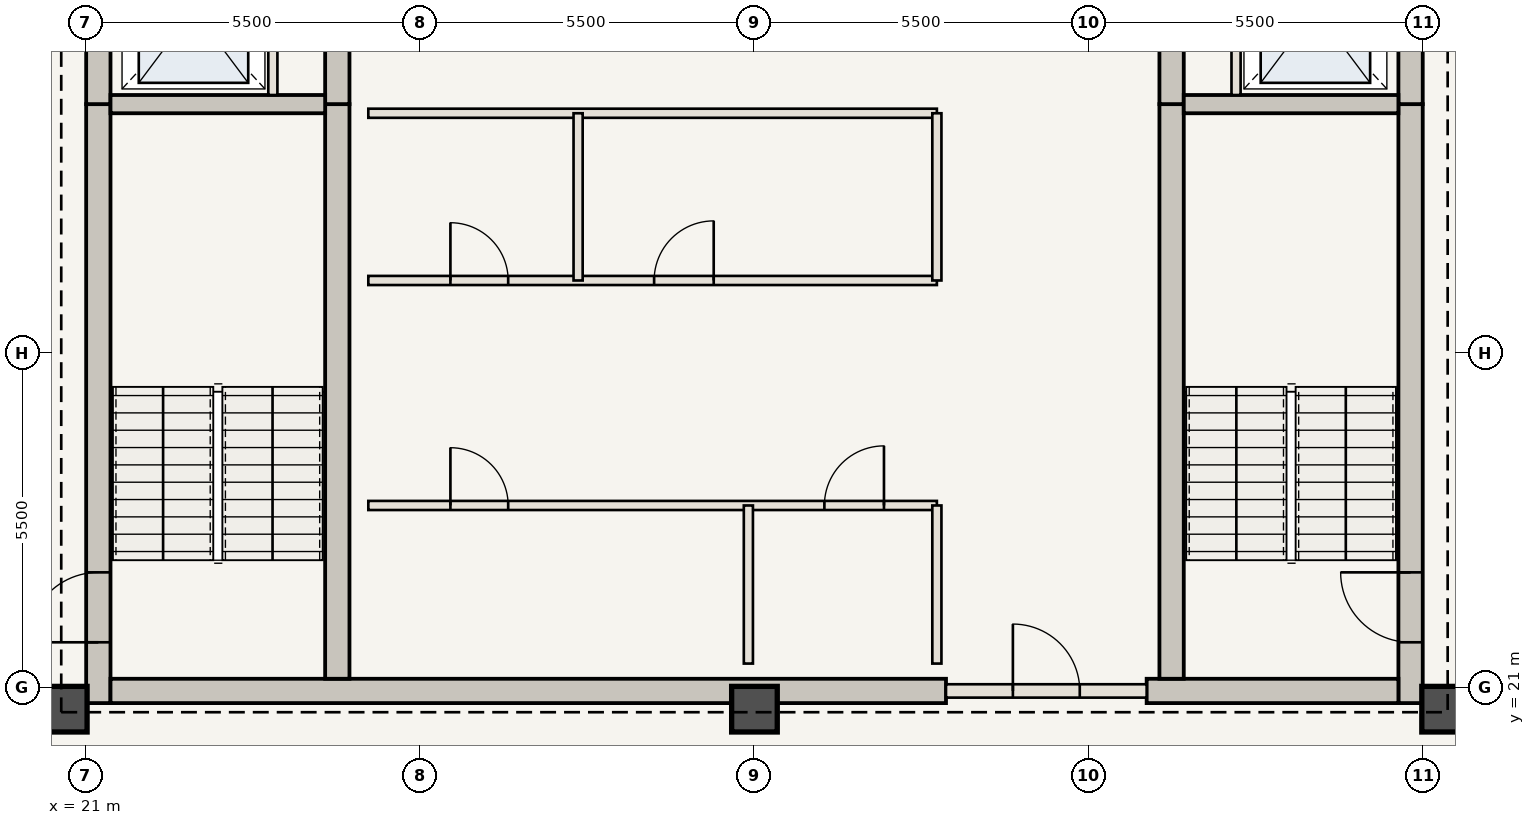
"""IFC4 building model, lengths in metres.
Left out: names, types, materials, properties, quantities, classifications, styles, units other than length and angle.
Written with IfcOpenShell. Run it as: python <this file> out.ifc"""

import sys

from ifc_helpers import new_model, si_unit, direction, frame, frame_2d, origin, origin_2d, place, context, subcontext, project, spatial, rectangle, extrude, element, fill, save


model = new_model("IFC4")
c1 = context("Model", 3, precision=1e-05, world=origin(), true_north=direction((0.0, 1.0)))
c2 = subcontext(c1, "Body", "Model", "MODEL_VIEW")
j1 = project(units=[si_unit("LENGTHUNIT", "METRE"), si_unit("PLANEANGLEUNIT", "RADIAN")], contexts=[c1])
p1 = place(None, origin())
s1 = spatial("IfcSite", under=j1, at=p1, CompositionType="ELEMENT")
p2 = place(p1, origin())
s2 = spatial("IfcBuilding", under=s1, at=p2, CompositionType="ELEMENT")
p3 = place(p2, frame((0.0, 0.0, 292.95)))
s3 = spatial("IfcBuildingStorey", under=s2, at=p3, CompositionType="ELEMENT", Elevation=292.95)
p4 = place(p3, frame((21.21, 20.75, 0.0), z_axis=(0.0, 0.0, 1.0), x_axis=(0.0, 1.0, 0.0)))
e1 = element("IfcWall", 1, at=p4, inside=s3, PredefinedType="SHEAR", context=c2, shape_type="SweptSolid", body=[
    extrude(rectangle(XDim=9.85, YDim=0.4, at=frame_2d((4.925, 0.0))), origin(), (0.0, 0.0, 1.0), 3.85),
])
p5 = place(p4, frame((1.0, 0.0, 0.0)))
e2 = element("IfcOpeningElement", 2, at=p5, cuts=e1, PredefinedType="OPENING", context=c2, shape_type="SweptSolid", body=[
    extrude(rectangle(XDim=1.15, YDim=2.15, at=frame_2d((0.575, 1.075))), frame((0.0, 0.21, 0.0), z_axis=(0.0, -1.0, 0.0), x_axis=(1.0, 0.0, 0.0)), (0.0, 0.0, 1.0), 0.42),
])
p6 = place(p3, frame((21.21, 30.6, 0.0), z_axis=(0.0, 0.0, 1.0), x_axis=(0.0, 1.0, 0.0)))
e3 = element("IfcWall", 3, at=p6, inside=s3, PredefinedType="SHEAR", context=c2, shape_type="SweptSolid", body=[
    extrude(rectangle(XDim=12.6, YDim=0.4, at=frame_2d((6.3, 0.0))), origin(), (0.0, 0.0, 1.0), 3.85),
])
p7 = place(p6, frame((4.2, 0.0, 0.0)))
e4 = element("IfcOpeningElement", 4, at=p7, cuts=e3, PredefinedType="OPENING", context=c2, shape_type="SweptSolid", body=[
    extrude(rectangle(XDim=1.1, YDim=2.15, at=frame_2d((0.55, 1.075))), frame((0.0, 0.21, 0.0), z_axis=(0.0, -1.0, 0.0), x_axis=(1.0, 0.0, 0.0)), (0.0, 0.0, 1.0), 0.42),
])
p8 = place(p6, frame((8.05, 0.0, 0.0)))
e5 = element("IfcOpeningElement", 5, at=p8, cuts=e3, PredefinedType="OPENING", context=c2, shape_type="SweptSolid", body=[
    extrude(rectangle(XDim=0.92, YDim=2.1, at=frame_2d((0.46, 1.05))), frame((0.0, 0.21, 0.0), z_axis=(0.0, -1.0, 0.0), x_axis=(1.0, 0.0, 0.0)), (0.0, 0.0, 1.0), 0.42),
])
p9 = place(p6, frame((9.45, 0.0, 0.0)))
e6 = element("IfcOpeningElement", 6, at=p9, cuts=e3, PredefinedType="OPENING", context=c2, shape_type="SweptSolid", body=[
    extrude(rectangle(XDim=0.88, YDim=2.1, at=frame_2d((0.44, 1.05))), frame((0.0, 0.21, 0.0), z_axis=(0.0, -1.0, 0.0), x_axis=(1.0, 0.0, 0.0)), (0.0, 0.0, 1.0), 0.42),
])
p10 = place(p6, frame((10.85, 0.0, 0.0)))
e7 = element("IfcOpeningElement", 7, at=p10, cuts=e3, PredefinedType="OPENING", context=c2, shape_type="SweptSolid", body=[
    extrude(rectangle(XDim=0.88, YDim=2.1, at=frame_2d((0.44, 1.05))), frame((0.0, 0.21, 0.0), z_axis=(0.0, -1.0, 0.0), x_axis=(1.0, 0.0, 0.0)), (0.0, 0.0, 1.0), 0.42),
])
p11 = place(p3, frame((42.79, 20.75, 0.0), z_axis=(0.0, 0.0, 1.0), x_axis=(0.0, 1.0, 0.0)))
e8 = element("IfcWall", 8, at=p11, inside=s3, PredefinedType="SHEAR", context=c2, shape_type="SweptSolid", body=[
    extrude(rectangle(XDim=9.85, YDim=0.4, at=frame_2d((4.925, 0.0))), origin(), (0.0, 0.0, 1.0), 3.85),
])
p12 = place(p11, frame((1.0, 0.0, 0.0)))
e9 = element("IfcOpeningElement", 9, at=p12, cuts=e8, PredefinedType="OPENING", context=c2, shape_type="SweptSolid", body=[
    extrude(rectangle(XDim=1.15, YDim=2.15, at=frame_2d((0.575, 1.075))), frame((0.0, 0.21, 0.0), z_axis=(0.0, -1.0, 0.0), x_axis=(1.0, 0.0, 0.0)), (0.0, 0.0, 1.0), 0.42),
])
p13 = place(p3, frame((42.79, 30.6, 0.0), z_axis=(0.0, 0.0, 1.0), x_axis=(0.0, 1.0, 0.0)))
e10 = element("IfcWall", 10, at=p13, inside=s3, PredefinedType="SHEAR", context=c2, shape_type="SweptSolid", body=[
    extrude(rectangle(XDim=12.6, YDim=0.4, at=frame_2d((6.3, 0.0))), origin(), (0.0, 0.0, 1.0), 3.85),
])
p14 = place(p13, frame((4.2, 0.0, 0.0)))
e11 = element("IfcOpeningElement", 11, at=p14, cuts=e10, PredefinedType="OPENING", context=c2, shape_type="SweptSolid", body=[
    extrude(rectangle(XDim=1.1, YDim=2.15, at=frame_2d((0.55, 1.075))), frame((0.0, 0.21, 0.0), z_axis=(0.0, -1.0, 0.0), x_axis=(1.0, 0.0, 0.0)), (0.0, 0.0, 1.0), 0.42),
])
p15 = place(p13, frame((9.2, 0.0, 0.0)))
e12 = element("IfcOpeningElement", 12, at=p15, cuts=e10, PredefinedType="OPENING", context=c2, shape_type="SweptSolid", body=[
    extrude(rectangle(XDim=0.92, YDim=2.1, at=frame_2d((0.46, 1.05))), frame((0.0, 0.21, 0.0), z_axis=(0.0, -1.0, 0.0), x_axis=(1.0, 0.0, 0.0)), (0.0, 0.0, 1.0), 0.42),
])
p16 = place(p3, frame((21.41, 20.95, 0.0), z_axis=(0.0, 0.0, 1.0), x_axis=(1.0, 0.0, 0.0)))
e13 = element("IfcWall", 13, at=p16, inside=s3, PredefinedType="SHEAR", context=c2, shape_type="SweptSolid", body=[
    extrude(rectangle(XDim=13.74, YDim=0.4, at=frame_2d((6.87, 0.0))), origin(), (0.0, 0.0, 1.0), 3.85),
])
p17 = place(p3, frame((38.45, 20.95, 0.0), z_axis=(0.0, 0.0, 1.0), x_axis=(1.0, 0.0, 0.0)))
e14 = element("IfcWall", 14, at=p17, inside=s3, PredefinedType="SHEAR", context=c2, shape_type="SweptSolid", body=[
    extrude(rectangle(XDim=4.14, YDim=0.4, at=frame_2d((2.07, 0.0))), origin(), (0.0, 0.0, 1.0), 3.85),
])
p18 = place(p3, frame((25.14, 21.15, 0.0), z_axis=(0.0, 0.0, 1.0), x_axis=(0.0, 1.0, 0.0)))
e15 = element("IfcWall", 15, at=p18, inside=s3, PredefinedType="SHEAR", context=c2, shape_type="SweptSolid", body=[
    extrude(rectangle(XDim=9.45, YDim=0.4, at=frame_2d((4.725, 0.0))), origin(), (0.0, 0.0, 1.0), 3.85),
])
p19 = place(p3, frame((25.14, 30.6, 0.0), z_axis=(0.0, 0.0, 1.0), x_axis=(0.0, 1.0, 0.0)))
e16 = element("IfcWall", 16, at=p19, inside=s3, PredefinedType="SHEAR", context=c2, shape_type="SweptSolid", body=[
    extrude(rectangle(XDim=12.2, YDim=0.4, at=frame_2d((6.1, 0.0))), origin(), (0.0, 0.0, 1.0), 3.85),
])
p20 = place(p19, frame((6.25, 0.0, 0.0)))
e17 = element("IfcOpeningElement", 17, at=p20, cuts=e16, PredefinedType="OPENING", context=c2, shape_type="SweptSolid", body=[
    extrude(rectangle(XDim=1.1, YDim=2.15, at=frame_2d((0.55, 1.075))), frame((0.0, 0.21, 0.0), z_axis=(0.0, -1.0, 0.0), x_axis=(1.0, 0.0, 0.0)), (0.0, 0.0, 1.0), 0.42),
])
p21 = place(p3, frame((38.86, 21.15, 0.0), z_axis=(0.0, 0.0, 1.0), x_axis=(0.0, 1.0, 0.0)))
e18 = element("IfcWall", 18, at=p21, inside=s3, PredefinedType="SHEAR", context=c2, shape_type="SweptSolid", body=[
    extrude(rectangle(XDim=9.45, YDim=0.4, at=frame_2d((4.725, 0.0))), origin(), (0.0, 0.0, 1.0), 3.85),
])
p22 = place(p3, frame((38.86, 30.6, 0.0), z_axis=(0.0, 0.0, 1.0), x_axis=(0.0, 1.0, 0.0)))
e19 = element("IfcWall", 19, at=p22, inside=s3, PredefinedType="SHEAR", context=c2, shape_type="SweptSolid", body=[
    extrude(rectangle(XDim=12.2, YDim=0.4, at=frame_2d((6.1, 0.0))), origin(), (0.0, 0.0, 1.0), 3.85),
])
for number, where, z_axis, x_axis in (
    (20, (20.65, 20.65, 0.0), (0.0, 0.0, 1.0), (1.0, 0.0, 0.0)),
    (21, (32.0, 20.65, 0.0), (0.0, 0.0, 1.0), (1.0, 0.0, 0.0)),
    (22, (43.35, 20.65, 0.0), (0.0, 0.0, 1.0), (1.0, 0.0, 0.0)),
):
    element("IfcColumn", number, at=place(p3, frame(where, z_axis=z_axis, x_axis=x_axis)), inside=s3, PredefinedType="COLUMN", context=c2, shape_type="SweptSolid", body=[
        extrude(rectangle(XDim=0.75, YDim=0.75, at=origin_2d()), origin(), (0.0, 0.0, 1.0), 3.85),
    ])
for number, where, z_axis, x_axis in (
    (23, (21.41, 30.6, 0.0), (0.0, 0.0, 1.0), (1.0, 0.0, 0.0)),
    (24, (39.06, 30.6, 0.0), (0.0, 0.0, 1.0), (1.0, 0.0, 0.0)),
):
    element("IfcWall", number, at=place(p3, frame(where, z_axis=z_axis, x_axis=x_axis)), inside=s3, PredefinedType="SHEAR", context=c2, shape_type="SweptSolid", body=[
        extrude(rectangle(XDim=3.53, YDim=0.3, at=frame_2d((1.765, 0.0))), origin(), (0.0, 0.0, 1.0), 3.685),
    ])
for number, where, z_axis, x_axis in (
    (25, (24.08, 30.75, 0.0), (0.0, 0.0, 1.0), (0.0, 1.0, 0.0)),
    (26, (39.92, 30.75, 0.0), (0.0, 0.0, 1.0), (0.0, 1.0, 0.0)),
):
    element("IfcWall", number, at=place(p3, frame(where, z_axis=z_axis, x_axis=x_axis)), inside=s3, PredefinedType="STANDARD", context=c2, shape_type="SweptSolid", body=[
        extrude(rectangle(XDim=2.65, YDim=0.15, at=frame_2d((1.325, 0.0))), origin(), (0.0, 0.0, 1.0), 3.685),
    ])
p23 = place(p3, frame((35.15, 20.95, 0.0), z_axis=(0.0, 0.0, 1.0), x_axis=(1.0, 0.0, 0.0)))
e27 = element("IfcWall", 27, at=p23, inside=s3, PredefinedType="STANDARD", context=c2, shape_type="SweptSolid", body=[
    extrude(rectangle(XDim=3.3, YDim=0.22, at=frame_2d((1.65, 0.0))), origin(), (0.0, 0.0, 1.0), 3.685),
])
p24 = place(p23, frame((1.1, 0.0, 0.0)))
e28 = element("IfcOpeningElement", 28, at=p24, cuts=e27, PredefinedType="OPENING", context=c2, shape_type="SweptSolid", body=[
    extrude(rectangle(XDim=1.1, YDim=2.15, at=frame_2d((0.55, 1.075))), frame((0.0, 0.12, 0.0), z_axis=(0.0, -1.0, 0.0), x_axis=(1.0, 0.0, 0.0)), (0.0, 0.0, 1.0), 0.24),
])
p25 = place(p3, frame((25.65, 24.0, 0.0), z_axis=(0.0, 0.0, 1.0), x_axis=(1.0, 0.0, 0.0)))
e29 = element("IfcWall", 29, at=p25, inside=s3, PredefinedType="STANDARD", context=c2, shape_type="SweptSolid", body=[
    extrude(rectangle(XDim=9.35, YDim=0.15, at=frame_2d((4.675, 0.0))), origin(), (0.0, 0.0, 1.0), 3.685),
])
p26 = place(p25, frame((1.35, 0.0, 0.0)))
e30 = element("IfcOpeningElement", 30, at=p26, cuts=e29, PredefinedType="OPENING", context=c2, shape_type="SweptSolid", body=[
    extrude(rectangle(XDim=0.95, YDim=2.15, at=frame_2d((0.475, 1.075))), frame((0.0, 0.085, 0.0), z_axis=(0.0, -1.0, 0.0), x_axis=(1.0, 0.0, 0.0)), (0.0, 0.0, 1.0), 0.17),
])
p27 = place(p25, frame((7.5, 0.0, 0.0)))
e31 = element("IfcOpeningElement", 31, at=p27, cuts=e29, PredefinedType="OPENING", context=c2, shape_type="SweptSolid", body=[
    extrude(rectangle(XDim=0.98, YDim=2.2, at=frame_2d((0.49, 1.1))), frame((0.0, 0.085, 0.0), z_axis=(0.0, -1.0, 0.0), x_axis=(1.0, 0.0, 0.0)), (0.0, 0.0, 1.0), 0.17),
])
for number, where, z_axis, x_axis in (
    (32, (31.9, 21.4, 0.0), (0.0, 0.0, 1.0), (0.0, 1.0, 0.0)),
    (33, (35.0, 21.4, 0.0), (0.0, 0.0, 1.0), (0.0, 1.0, 0.0)),
):
    element("IfcWall", number, at=place(p3, frame(where, z_axis=z_axis, x_axis=x_axis)), inside=s3, PredefinedType="STANDARD", context=c2, shape_type="SweptSolid", body=[
        extrude(rectangle(XDim=2.6, YDim=0.15, at=frame_2d((1.3, 0.0))), origin(), (0.0, 0.0, 1.0), 3.685),
    ])
p28 = place(p3, frame((25.65, 27.7, 0.0), z_axis=(0.0, 0.0, 1.0), x_axis=(1.0, 0.0, 0.0)))
e34 = element("IfcWall", 34, at=p28, inside=s3, PredefinedType="STANDARD", context=c2, shape_type="SweptSolid", body=[
    extrude(rectangle(XDim=9.35, YDim=0.15, at=frame_2d((4.675, 0.0))), origin(), (0.0, 0.0, 1.0), 3.685),
])
p29 = place(p28, frame((1.35, 0.0, 0.0)))
e35 = element("IfcOpeningElement", 35, at=p29, cuts=e34, PredefinedType="OPENING", context=c2, shape_type="SweptSolid", body=[
    extrude(rectangle(XDim=0.95, YDim=2.15, at=frame_2d((0.475, 1.075))), frame((0.0, 0.085, 0.0), z_axis=(0.0, -1.0, 0.0), x_axis=(1.0, 0.0, 0.0)), (0.0, 0.0, 1.0), 0.17),
])
p30 = place(p28, frame((4.7, 0.0, 0.0)))
e36 = element("IfcOpeningElement", 36, at=p30, cuts=e34, PredefinedType="OPENING", context=c2, shape_type="SweptSolid", body=[
    extrude(rectangle(XDim=0.98, YDim=2.2, at=frame_2d((0.49, 1.1))), frame((0.0, 0.085, 0.0), z_axis=(0.0, -1.0, 0.0), x_axis=(1.0, 0.0, 0.0)), (0.0, 0.0, 1.0), 0.17),
])
p31 = place(p3, frame((25.65, 30.45, 0.0), z_axis=(0.0, 0.0, 1.0), x_axis=(1.0, 0.0, 0.0)))
e37 = element("IfcWall", 37, at=p31, inside=s3, PredefinedType="STANDARD", context=c2, shape_type="SweptSolid", body=[
    extrude(rectangle(XDim=9.35, YDim=0.15, at=frame_2d((4.675, 0.0))), origin(), (0.0, 0.0, 1.0), 3.685),
])
for number, where, z_axis, x_axis in (
    (38, (29.1, 27.7, 0.0), (0.0, 0.0, 1.0), (0.0, 1.0, 0.0)),
    (39, (35.0, 27.7, 0.0), (0.0, 0.0, 1.0), (0.0, 1.0, 0.0)),
):
    element("IfcWall", number, at=place(p3, frame(where, z_axis=z_axis, x_axis=x_axis)), inside=s3, PredefinedType="STANDARD", context=c2, shape_type="SweptSolid", body=[
        extrude(rectangle(XDim=2.75, YDim=0.15, at=frame_2d((1.375, 0.0))), origin(), (0.0, 0.0, 1.0), 3.685),
    ])
p32 = place(p5, origin())
e40 = element("IfcDoor", 40, at=p32, inside=s3, OperationType="SINGLE_SWING_LEFT", PredefinedType="DOOR", context=c2, shape_type="SweptSolid", body=[
    extrude(rectangle(XDim=1.15, YDim=2.15, at=frame_2d((0.575, 1.075))), frame((0.0, 0.025, 0.0), z_axis=(0.0, -1.0, 0.0), x_axis=(1.0, 0.0, 0.0)), (0.0, 0.0, 1.0), 0.05),
])
fill(e2, e40)
p33 = place(p12, origin())
e41 = element("IfcDoor", 41, at=p33, inside=s3, OperationType="SINGLE_SWING_RIGHT", PredefinedType="DOOR", context=c2, shape_type="SweptSolid", body=[
    extrude(rectangle(XDim=1.15, YDim=2.15, at=frame_2d((0.575, 1.075))), frame((0.0, 0.025, 0.0), z_axis=(0.0, -1.0, 0.0), x_axis=(1.0, 0.0, 0.0)), (0.0, 0.0, 1.0), 0.05),
])
fill(e9, e41)
p34 = place(p24, origin())
e42 = element("IfcDoor", 42, at=p34, inside=s3, OperationType="SINGLE_SWING_LEFT", PredefinedType="DOOR", context=c2, shape_type="SweptSolid", body=[
    extrude(rectangle(XDim=1.1, YDim=2.15, at=frame_2d((0.55, 1.075))), frame((0.0, 0.025, 0.0), z_axis=(0.0, -1.0, 0.0), x_axis=(1.0, 0.0, 0.0)), (0.0, 0.0, 1.0), 0.05),
])
fill(e28, e42)
p35 = place(p26, origin())
e43 = element("IfcDoor", 43, at=p35, inside=s3, OperationType="SINGLE_SWING_LEFT", PredefinedType="DOOR", context=c2, shape_type="SweptSolid", body=[
    extrude(rectangle(XDim=0.95, YDim=2.15, at=frame_2d((0.475, 1.075))), frame((0.0, 0.025, 0.0), z_axis=(0.0, -1.0, 0.0), x_axis=(1.0, 0.0, 0.0)), (0.0, 0.0, 1.0), 0.05),
])
fill(e30, e43)
p36 = place(p27, origin())
e44 = element("IfcDoor", 44, at=p36, inside=s3, OperationType="SINGLE_SWING_RIGHT", PredefinedType="DOOR", context=c2, shape_type="SweptSolid", body=[
    extrude(rectangle(XDim=0.98, YDim=2.2, at=frame_2d((0.49, 1.1))), frame((0.0, 0.025, 0.0), z_axis=(0.0, -1.0, 0.0), x_axis=(1.0, 0.0, 0.0)), (0.0, 0.0, 1.0), 0.05),
])
fill(e31, e44)
p37 = place(p29, origin())
e45 = element("IfcDoor", 45, at=p37, inside=s3, OperationType="SINGLE_SWING_LEFT", PredefinedType="DOOR", context=c2, shape_type="SweptSolid", body=[
    extrude(rectangle(XDim=0.95, YDim=2.15, at=frame_2d((0.475, 1.075))), frame((0.0, 0.025, 0.0), z_axis=(0.0, -1.0, 0.0), x_axis=(1.0, 0.0, 0.0)), (0.0, 0.0, 1.0), 0.05),
])
fill(e35, e45)
p38 = place(p30, origin())
e46 = element("IfcDoor", 46, at=p38, inside=s3, OperationType="SINGLE_SWING_RIGHT", PredefinedType="DOOR", context=c2, shape_type="SweptSolid", body=[
    extrude(rectangle(XDim=0.98, YDim=2.2, at=frame_2d((0.49, 1.1))), frame((0.0, 0.025, 0.0), z_axis=(0.0, -1.0, 0.0), x_axis=(1.0, 0.0, 0.0)), (0.0, 0.0, 1.0), 0.05),
])
fill(e36, e46)
save(model, sys.argv[1])
